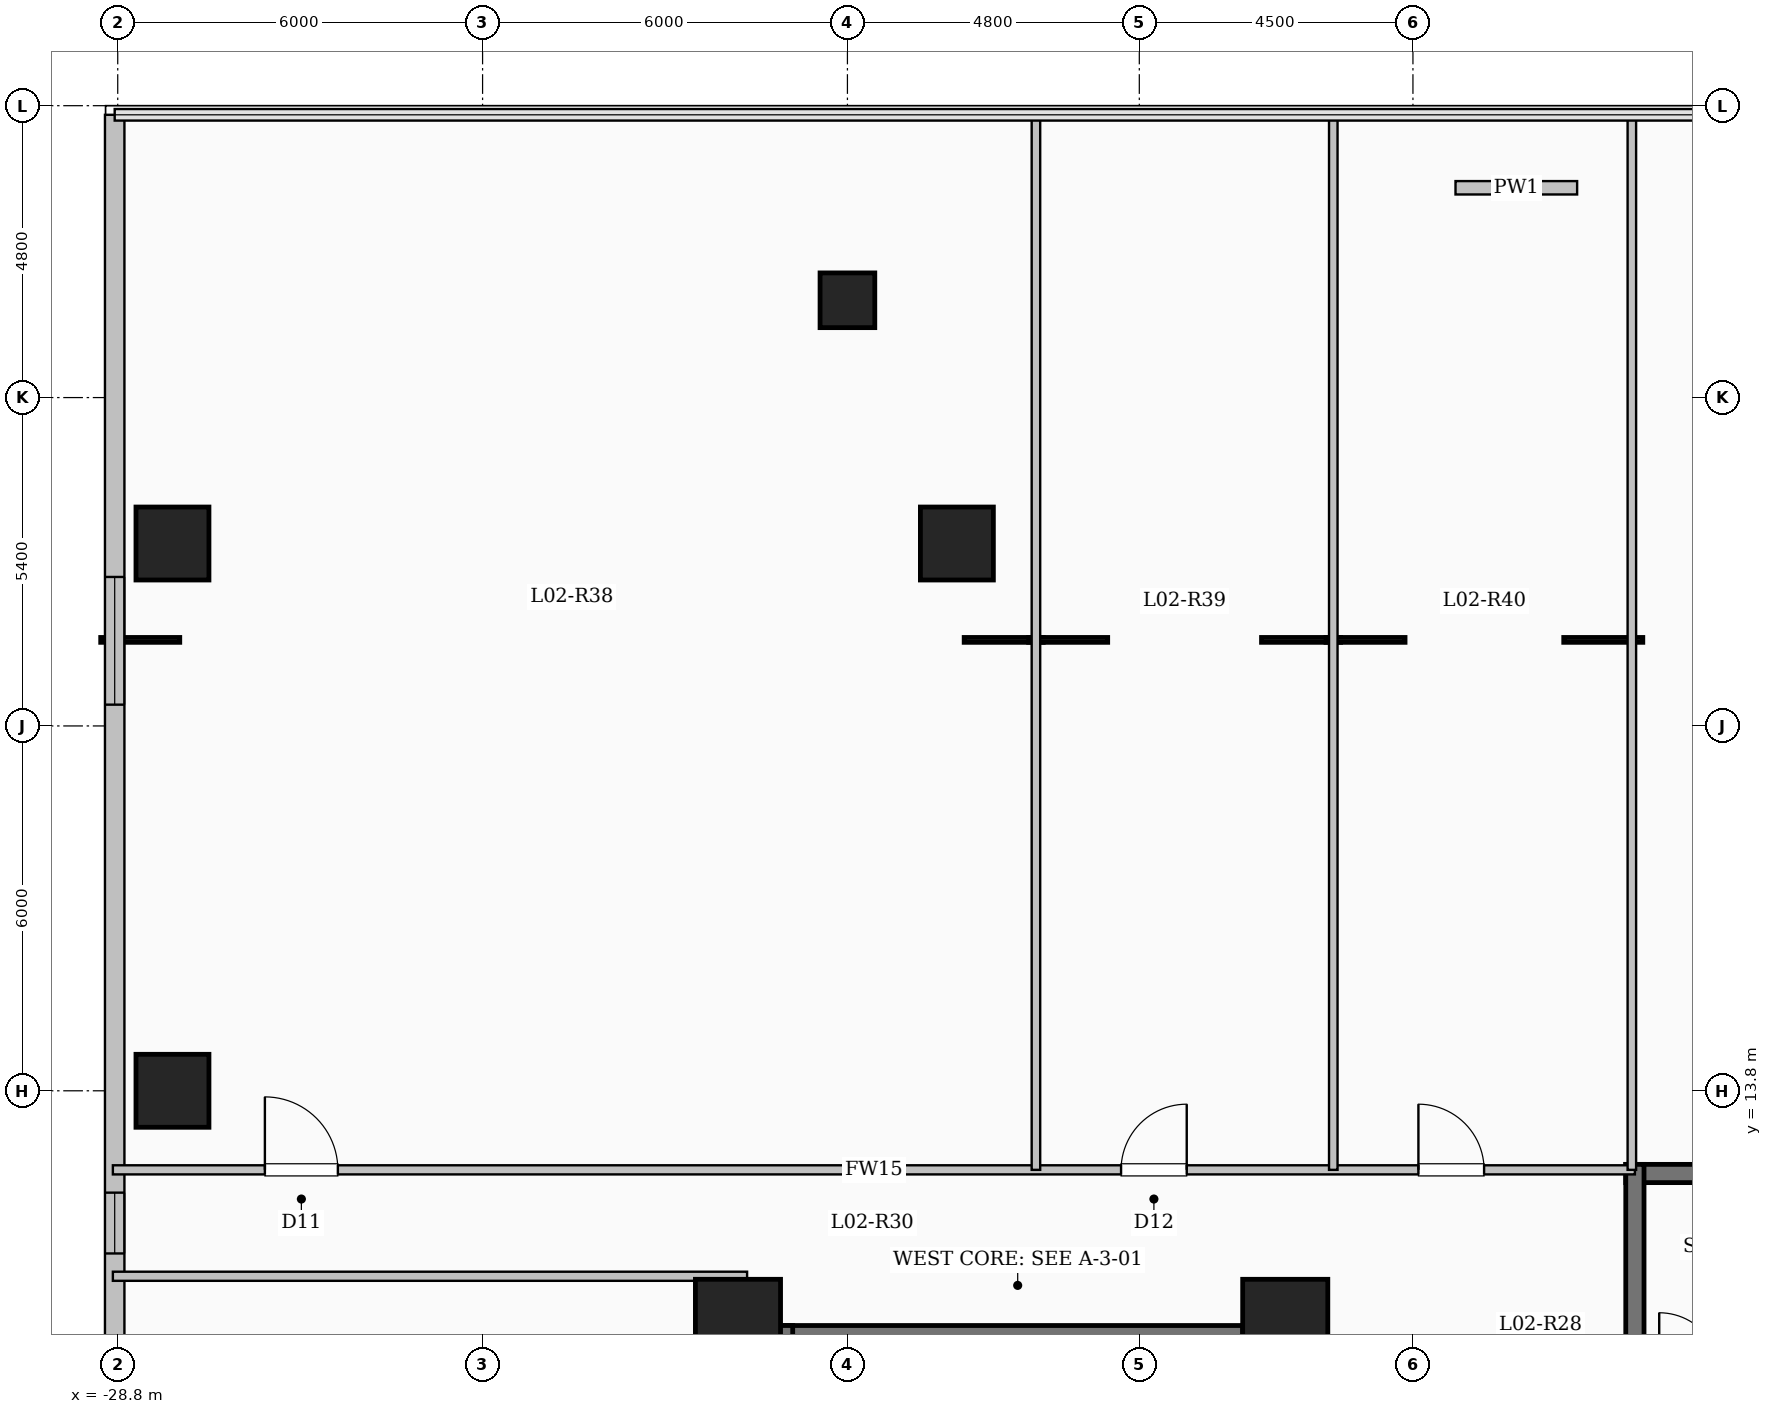
"""IFC4 building model, lengths in metres.
Left out: names, types, materials, properties, quantities, classifications, styles, units other than length and angle.
Written with IfcOpenShell. Run it as: python <this file> out.ifc"""

import sys

from ifc_helpers import new_model, si_unit, direction, frame, frame_2d, origin, origin_2d, place, context, subcontext, project, spatial, rectangle, extrude, element, fill, save


model = new_model("IFC4")
c1 = context("Model", 3, precision=1e-05, world=origin(), true_north=direction((0.0, 1.0)))
c2 = subcontext(c1, "Body", "Model", "MODEL_VIEW")
j1 = project(units=[si_unit("LENGTHUNIT", "METRE"), si_unit("PLANEANGLEUNIT", "RADIAN")], contexts=[c1])
p1 = place(None, origin())
s1 = spatial("IfcSite", under=j1, at=p1, CompositionType="ELEMENT")
p2 = place(p1, origin())
s2 = spatial("IfcBuilding", under=s1, at=p2, CompositionType="ELEMENT")
p3 = place(p2, frame((0.0, 0.0, 9.9)))
s3 = spatial("IfcBuildingStorey", under=s2, at=p3, CompositionType="ELEMENT", Elevation=9.9)
for number, where, z_axis, x_axis in (
    (1, (-9.6, 10.0, 0.0), (0.0, 0.0, 1.0), (1.0, 0.0, 0.0)),
    (2, (-18.6, 10.0, 0.0), (0.0, 0.0, 1.0), (1.0, 0.0, 0.0)),
):
    element("IfcColumn", number, at=place(p3, frame(where, z_axis=z_axis, x_axis=x_axis)), inside=s3, PredefinedType="COLUMN", context=c2, shape_type="SweptSolid", body=[
        extrude(rectangle(XDim=1.4, YDim=1.4, at=origin_2d()), origin(), (0.0, 0.0, 1.0), 4.5),
    ])
p4 = place(p3, frame((-16.8, 26.8, 0.0), z_axis=(0.0, 0.0, 1.0), x_axis=(1.0, 0.0, 0.0)))
e3 = element("IfcColumn", 3, at=p4, inside=s3, PredefinedType="COLUMN", context=c2, shape_type="SweptSolid", body=[
    extrude(rectangle(XDim=0.9, YDim=0.9, at=origin_2d()), origin(), (0.0, 0.0, 1.0), 4.5),
])
for number, where, z_axis, x_axis in (
    (4, (-27.9, 22.8, 0.0), (0.0, 0.0, 1.0), (1.0, 0.0, 0.0)),
    (5, (-15.0, 22.8, 0.0), (0.0, 0.0, 1.0), (1.0, 0.0, 0.0)),
    (6, (-27.9, 13.8, 0.0), (0.0, 0.0, 1.0), (1.0, 0.0, 0.0)),
):
    element("IfcColumn", number, at=place(p3, frame(where, z_axis=z_axis, x_axis=x_axis)), inside=s3, PredefinedType="COLUMN", context=c2, shape_type="SweptSolid", body=[
        extrude(rectangle(XDim=1.2, YDim=1.2, at=origin_2d()), origin(), (0.0, 0.0, 1.0), 4.5),
    ])
p5 = place(p3, frame((-28.85, -29.85, 0.0), z_axis=(0.0, 0.0, 1.0), x_axis=(0.0, 1.0, 0.0)))
e7 = element("IfcWall", 7, at=p5, inside=s3, PredefinedType="SOLIDWALL", context=c2, shape_type="SweptSolid", body=[
    extrude(rectangle(XDim=59.7, YDim=0.32, at=frame_2d((29.85, 0.0))), origin(), (0.0, 0.0, 1.0), 4.2),
])
p6 = place(p5, frame((8.65, 0.0, 0.9)))
e8 = element("IfcOpeningElement", 8, at=p6, cuts=e7, PredefinedType="OPENING", context=c2, shape_type="SweptSolid", body=[
    extrude(rectangle(XDim=2.1, YDim=2.0, at=frame_2d((1.05, 1.0))), frame((0.0, 0.17, 0.0), z_axis=(0.0, -1.0, 0.0), x_axis=(1.0, 0.0, 0.0)), (0.0, 0.0, 1.0), 0.34),
])
p7 = place(p5, frame((20.242, 0.0, 0.9)))
e9 = element("IfcOpeningElement", 9, at=p7, cuts=e7, PredefinedType="OPENING", context=c2, shape_type="SweptSolid", body=[
    extrude(rectangle(XDim=1.7, YDim=1.9, at=frame_2d((0.85, 0.95))), frame((0.0, 0.17, 0.0), z_axis=(0.0, -1.0, 0.0), x_axis=(1.0, 0.0, 0.0)), (0.0, 0.0, 1.0), 0.34),
])
p8 = place(p5, frame((30.55, 0.0, 0.9)))
e10 = element("IfcOpeningElement", 10, at=p8, cuts=e7, PredefinedType="OPENING", context=c2, shape_type="SweptSolid", body=[
    extrude(rectangle(XDim=2.1, YDim=2.0, at=frame_2d((1.05, 1.0))), frame((0.0, 0.17, 0.0), z_axis=(0.0, -1.0, 0.0), x_axis=(1.0, 0.0, 0.0)), (0.0, 0.0, 1.0), 0.34),
])
p9 = place(p5, frame((40.975, 0.0, 0.95)))
e11 = element("IfcOpeningElement", 11, at=p9, cuts=e7, PredefinedType="OPENING", context=c2, shape_type="SweptSolid", body=[
    extrude(rectangle(XDim=1.0, YDim=1.5, at=frame_2d((0.5, 0.75))), frame((0.0, 0.17, 0.0), z_axis=(0.0, -1.0, 0.0), x_axis=(1.0, 0.0, 0.0)), (0.0, 0.0, 1.0), 0.34),
])
p10 = place(p5, frame((50.0, 0.0, 0.9)))
e12 = element("IfcOpeningElement", 12, at=p10, cuts=e7, PredefinedType="OPENING", context=c2, shape_type="SweptSolid", body=[
    extrude(rectangle(XDim=2.1, YDim=2.0, at=frame_2d((1.05, 1.0))), frame((0.0, 0.17, 0.0), z_axis=(0.0, -1.0, 0.0), x_axis=(1.0, 0.0, 0.0)), (0.0, 0.0, 1.0), 0.34),
])
p11 = place(p3, frame((-6.8, 28.65, 0.0), z_axis=(0.0, 0.0, 1.0), x_axis=(1.0, 0.0, 0.0)))
e13 = element("IfcWall", 13, at=p11, inside=s3, PredefinedType="PARAPET", context=c2, shape_type="SweptSolid", body=[
    extrude(rectangle(XDim=2.0, YDim=0.22, at=frame_2d((1.0, 0.0))), origin(), (0.0, 0.0, 1.0), 0.85),
])
p12 = place(p3, frame((-18.0, 9.79, 0.0), z_axis=(0.0, 0.0, 1.0), x_axis=(1.0, 0.0, 0.0)))
e14 = element("IfcWall", 14, at=p12, inside=s3, PredefinedType="SHEAR", context=c2, shape_type="SweptSolid", body=[
    extrude(rectangle(XDim=8.0, YDim=0.3, at=frame_2d((4.0, 0.0))), origin(), (0.0, 0.0, 1.0), 4.5),
])
for number, where, z_axis, x_axis in (
    (15, (-17.85, 6.35, 0.0), (0.0, 0.0, 1.0), (0.0, 1.0, 0.0)),
    (16, (-10.15, 6.35, 0.0), (0.0, 0.0, 1.0), (0.0, 1.0, 0.0)),
):
    element("IfcWall", number, at=place(p3, frame(where, z_axis=z_axis, x_axis=x_axis)), inside=s3, PredefinedType="SHEAR", context=c2, shape_type="SweptSolid", body=[
        extrude(rectangle(XDim=3.59, YDim=0.3, at=frame_2d((1.795, 0.0))), origin(), (0.0, 0.0, 1.0), 4.5),
    ])
p13 = place(p3, frame((-4.0, 12.44, 0.0), z_axis=(0.0, 0.0, 1.0), x_axis=(1.0, 0.0, 0.0)))
e17 = element("IfcWall", 17, at=p13, inside=s3, PredefinedType="SHEAR", context=c2, shape_type="SweptSolid", body=[
    extrude(rectangle(XDim=8.0, YDim=0.3, at=frame_2d((4.0, 0.0))), origin(), (0.0, 0.0, 1.0), 4.5),
])
p14 = place(p3, frame((-3.85, 9.0, 0.0), z_axis=(0.0, 0.0, 1.0), x_axis=(0.0, 1.0, 0.0)))
e18 = element("IfcWall", 18, at=p14, inside=s3, PredefinedType="SHEAR", context=c2, shape_type="SweptSolid", body=[
    extrude(rectangle(XDim=3.59, YDim=0.3, at=frame_2d((1.795, 0.0))), origin(), (0.0, 0.0, 1.0), 4.5),
])
p15 = place(p3, frame((-28.88, 12.5, 0.0), z_axis=(0.0, 0.0, 1.0), x_axis=(1.0, 0.0, 0.0)))
e19 = element("IfcWall", 19, at=p15, inside=s3, PredefinedType="PARTITIONING", context=c2, shape_type="SweptSolid", body=[
    extrude(rectangle(XDim=25.03, YDim=0.15, at=frame_2d((12.515, 0.0))), origin(), (0.0, 0.0, 1.0), 4.2),
])
p16 = place(p15, frame((2.5, 0.0, 0.0)))
e20 = element("IfcOpeningElement", 20, at=p16, cuts=e19, PredefinedType="OPENING", context=c2, shape_type="SweptSolid", body=[
    extrude(rectangle(XDim=1.2, YDim=2.15, at=frame_2d((0.6, 1.075))), frame((0.0, 0.085, 0.0), z_axis=(0.0, -1.0, 0.0), x_axis=(1.0, 0.0, 0.0)), (0.0, 0.0, 1.0), 0.17),
])
p17 = place(p15, frame((16.58, 0.0, 0.0)))
e21 = element("IfcOpeningElement", 21, at=p17, cuts=e19, PredefinedType="OPENING", context=c2, shape_type="SweptSolid", body=[
    extrude(rectangle(XDim=1.08, YDim=2.15, at=frame_2d((0.54, 1.075))), frame((0.0, 0.085, 0.0), z_axis=(0.0, -1.0, 0.0), x_axis=(1.0, 0.0, 0.0)), (0.0, 0.0, 1.0), 0.17),
])
p18 = place(p15, frame((21.47, 0.0, 0.0)))
e22 = element("IfcOpeningElement", 22, at=p18, cuts=e19, PredefinedType="OPENING", context=c2, shape_type="SweptSolid", body=[
    extrude(rectangle(XDim=1.08, YDim=2.15, at=frame_2d((0.54, 1.075))), frame((0.0, 0.085, 0.0), z_axis=(0.0, -1.0, 0.0), x_axis=(1.0, 0.0, 0.0)), (0.0, 0.0, 1.0), 0.17),
])
for number, where, z_axis, x_axis in (
    (23, (-3.9, 12.5, 0.0), (0.0, 0.0, 1.0), (0.0, 1.0, 0.0)),
    (24, (-13.7, 12.5, 0.0), (0.0, 0.0, 1.0), (0.0, 1.0, 0.0)),
    (25, (-8.81, 12.5, 0.0), (0.0, 0.0, 1.0), (0.0, 1.0, 0.0)),
):
    element("IfcWall", number, at=place(p3, frame(where, z_axis=z_axis, x_axis=x_axis)), inside=s3, PredefinedType="PARTITIONING", context=c2, shape_type="SweptSolid", body=[
        extrude(rectangle(XDim=17.38, YDim=0.14, at=frame_2d((8.69, 0.0))), origin(), (0.0, 0.0, 1.0), 4.2),
    ])
p19 = place(p3, frame((-28.88, 10.75, 0.0), z_axis=(0.0, 0.0, 1.0), x_axis=(1.0, 0.0, 0.0)))
e26 = element("IfcWall", 26, at=p19, inside=s3, PredefinedType="PARTITIONING", context=c2, shape_type="SweptSolid", body=[
    extrude(rectangle(XDim=10.43, YDim=0.15, at=frame_2d((5.215, 0.0))), origin(), (0.0, 0.0, 1.0), 4.2),
])
p20 = place(p9, origin())
e27 = element("IfcWindow", 27, at=p20, inside=s3, PartitioningType="SINGLE_PANEL", PredefinedType="WINDOW", context=c2, shape_type="SweptSolid", body=[
    extrude(rectangle(XDim=1.0, YDim=1.5, at=frame_2d((0.5, 0.75))), frame((0.0, 0.03, 0.0), z_axis=(0.0, -1.0, 0.0), x_axis=(1.0, 0.0, 0.0)), (0.0, 0.0, 1.0), 0.06),
])
fill(e11, e27)
p21 = place(p10, origin())
e28 = element("IfcWindow", 28, at=p21, inside=s3, PartitioningType="SINGLE_PANEL", PredefinedType="WINDOW", context=c2, shape_type="SweptSolid", body=[
    extrude(rectangle(XDim=2.1, YDim=2.0, at=frame_2d((1.05, 1.0))), frame((0.0, 0.03, 0.0), z_axis=(0.0, -1.0, 0.0), x_axis=(1.0, 0.0, 0.0)), (0.0, 0.0, 1.0), 0.06),
])
fill(e12, e28)
p22 = place(p16, origin())
e29 = element("IfcDoor", 29, at=p22, inside=s3, OperationType="SINGLE_SWING_LEFT", PredefinedType="DOOR", context=c2, shape_type="SweptSolid", body=[
    extrude(rectangle(XDim=1.2, YDim=2.15, at=frame_2d((0.6, 1.075))), frame((0.0, 0.025, 0.0), z_axis=(0.0, -1.0, 0.0), x_axis=(1.0, 0.0, 0.0)), (0.0, 0.0, 1.0), 0.05),
])
fill(e20, e29)
p23 = place(p17, origin())
e30 = element("IfcDoor", 30, at=p23, inside=s3, OperationType="SINGLE_SWING_RIGHT", PredefinedType="DOOR", context=c2, shape_type="SweptSolid", body=[
    extrude(rectangle(XDim=1.08, YDim=2.15, at=frame_2d((0.54, 1.075))), frame((0.0, 0.025, 0.0), z_axis=(0.0, -1.0, 0.0), x_axis=(1.0, 0.0, 0.0)), (0.0, 0.0, 1.0), 0.05),
])
fill(e21, e30)
p24 = place(p18, origin())
e31 = element("IfcDoor", 31, at=p24, inside=s3, OperationType="SINGLE_SWING_LEFT", PredefinedType="DOOR", context=c2, shape_type="SweptSolid", body=[
    extrude(rectangle(XDim=1.08, YDim=2.15, at=frame_2d((0.54, 1.075))), frame((0.0, 0.025, 0.0), z_axis=(0.0, -1.0, 0.0), x_axis=(1.0, 0.0, 0.0)), (0.0, 0.0, 1.0), 0.05),
])
fill(e22, e31)
save(model, sys.argv[1])
